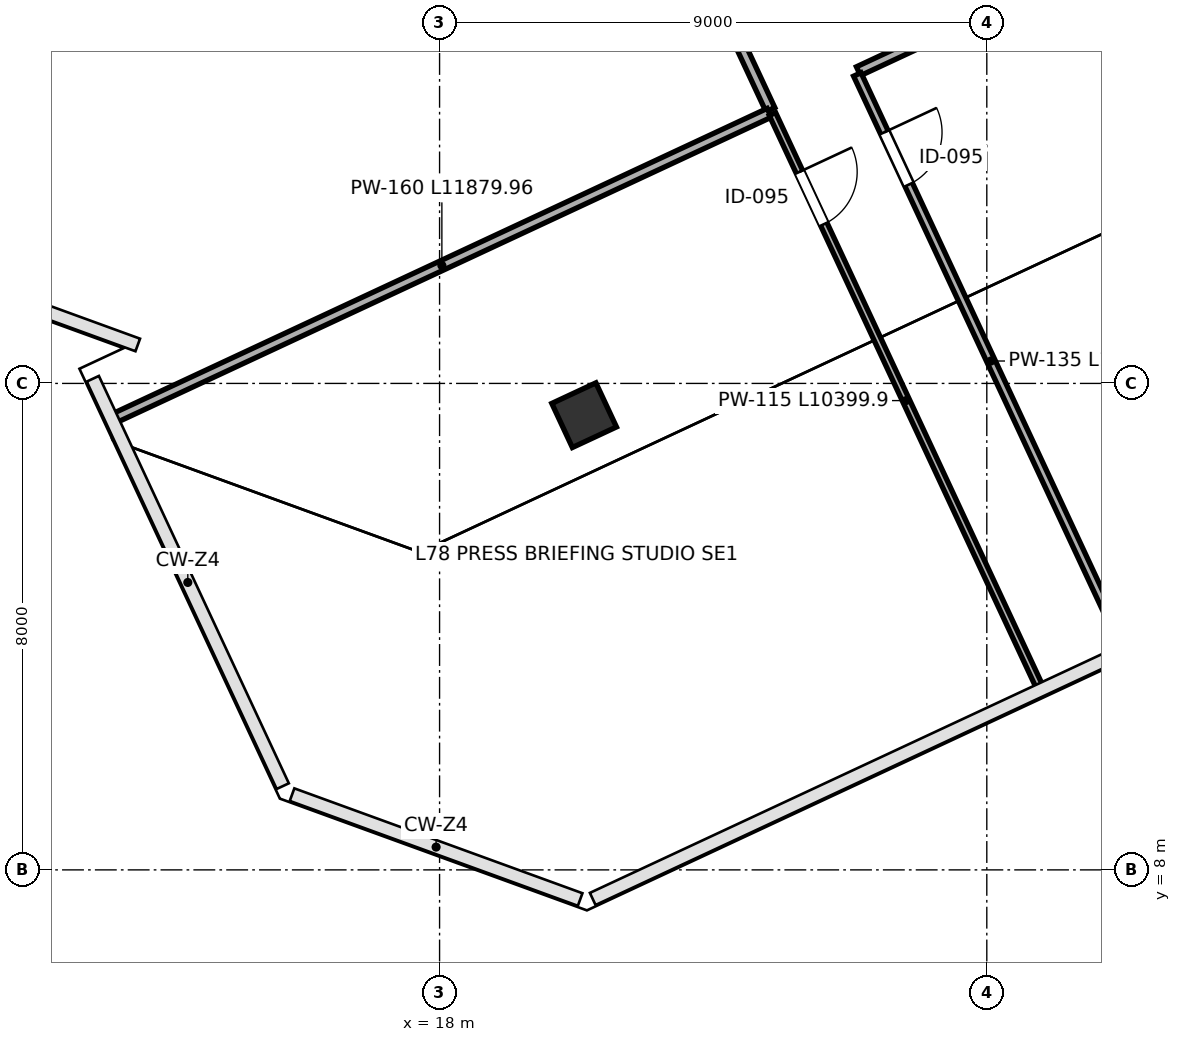
"""IFC4 building model, lengths in metres.
Left out: names, types, materials, properties, quantities, classifications, styles, units other than length and angle.
Written with IfcOpenShell. Run it as: python <this file> out.ifc"""

import sys

from ifc_helpers import new_model, si_unit, direction, frame, frame_2d, origin, origin_2d, place, context, subcontext, project, spatial, rectangle, extrude, clip, halfspace, source, transform, mapped, element, fill, save


model = new_model("IFC4")
c1 = context("Model", 3, precision=1e-05, world=origin(), true_north=direction((0.0, 1.0)))
c2 = subcontext(c1, "Body", "Model", "MODEL_VIEW")
j1 = project(units=[si_unit("LENGTHUNIT", "METRE"), si_unit("PLANEANGLEUNIT", "RADIAN")], contexts=[c1])
p1 = place(None, origin())
s1 = spatial("IfcSite", under=j1, at=p1, CompositionType="ELEMENT")
p2 = place(p1, origin())
s2 = spatial("IfcBuilding", under=s1, at=p2, CompositionType="ELEMENT")
p3 = place(p2, frame((0.0, 0.0, 345.0)))
s3 = spatial("IfcBuildingStorey", under=s2, at=p3, CompositionType="ELEMENT", Elevation=345.0)
p4 = place(p3, frame((20.377, 15.478, 0.0), z_axis=(-0.168828266365, 0.015181367691, 0.985528559988), x_axis=(0.927452745879, 0.340925094738, 0.153627744696)))
e1 = element("IfcColumn", 1, at=p4, inside=s3, PredefinedType="COLUMN", context=c2, shape_type="Clipping", body=[
    clip(clip(extrude(rectangle(XDim=0.8, YDim=0.8, at=origin_2d()), origin(), (0.0, 0.0, 1.0), 4.262), halfspace(frame((0.0, 0.0, 0.092), z_axis=(0.0, 0.0, -1.0), x_axis=(1.0, 0.0, 0.0)), False)), halfspace(frame((0.0, 0.0, 4.169), z_axis=(0.0, 0.0, 1.0), x_axis=(1.0, 0.0, 0.0)), False)),
])
p5 = place(p3, frame((21.864, 23.884, 0.0), z_axis=(0.0, 0.0, 1.0), x_axis=(0.42259522887, -0.906318527085, 0.0)))
e2 = element("IfcWall", 2, at=p5, inside=s3, PredefinedType="PARTITIONING", context=c2, shape_type="SweptSolid", body=[
    extrude(rectangle(XDim=3.73, YDim=0.16, at=frame_2d((1.865, 0.0))), origin(), (0.0, 0.0, 1.0), 3.92),
])
p6 = place(p3, frame((24.89, 21.135, 0.0), z_axis=(0.0, 0.0, 1.0), x_axis=(0.906308982529, 0.42261569799, 0.0)))
e3 = element("IfcWall", 3, at=p6, inside=s3, PredefinedType="PARTITIONING", context=c2, shape_type="SweptSolid", body=[
    extrude(rectangle(XDim=17.54, YDim=0.16, at=frame_2d((8.77, 0.0))), origin(), (0.0, 0.0, 1.0), 3.92),
])
p7 = place(p3, frame((12.654, 15.429, 0.0), z_axis=(0.0, 0.0, 1.0), x_axis=(0.906316447934, 0.42259968789, 0.0)))
e4 = element("IfcWall", 4, at=p7, inside=s3, PredefinedType="PARTITIONING", context=c2, shape_type="SweptSolid", body=[
    extrude(rectangle(XDim=11.88, YDim=0.16, at=frame_2d((5.94, 0.0))), origin(), (0.0, 0.0, 1.0), 3.92),
])
p8 = place(p3, frame((24.87, 21.081, 0.0), z_axis=(0.0, 0.0, 1.0), x_axis=(0.422623279804, -0.906305447058, 0.0)))
e5 = element("IfcWall", 5, at=p8, inside=s3, PredefinedType="PARTITIONING", context=c2, shape_type="SweptSolid", body=[
    extrude(rectangle(XDim=10.4, YDim=0.135, at=frame_2d((5.2, 0.0))), origin(), (0.0, 0.0, 1.0), 3.92),
])
p9 = place(p8, frame((1.05, 0.0, 0.0)))
e6 = element("IfcOpeningElement", 6, at=p9, cuts=e5, PredefinedType="OPENING", context=c2, shape_type="SweptSolid", body=[
    extrude(rectangle(XDim=0.95, YDim=2.15, at=frame_2d((0.475, 1.075))), frame((0.0, 0.078, 0.0), z_axis=(0.0, -1.0, 0.0), x_axis=(1.0, 0.0, 0.0)), (0.0, 0.0, 1.0), 0.155),
])
p10 = place(p3, frame((23.475, 20.43, 0.0), z_axis=(0.0, 0.0, 1.0), x_axis=(0.422603997267, -0.906314438533, 0.0)))
e7 = element("IfcWall", 7, at=p10, inside=s3, PredefinedType="PARTITIONING", context=c2, shape_type="SweptSolid", body=[
    extrude(rectangle(XDim=10.4, YDim=0.115, at=frame_2d((5.2, 0.0))), origin(), (0.0, 0.0, 1.0), 3.92),
])
p11 = place(p10, frame((1.05, 0.0, 0.0)))
e8 = element("IfcOpeningElement", 8, at=p11, cuts=e7, PredefinedType="OPENING", context=c2, shape_type="SweptSolid", body=[
    extrude(rectangle(XDim=0.95, YDim=2.15, at=frame_2d((0.475, 1.075))), frame((0.0, 0.067, 0.0), z_axis=(0.0, -1.0, 0.0), x_axis=(1.0, 0.0, 0.0)), (0.0, 0.0, 1.0), 0.135),
])
m1 = source(origin(), c2, "Body", "SweptSolid", [
    extrude(rectangle(XDim=0.95, YDim=2.15, at=frame_2d((0.475, 1.075))), frame((0.0, 0.025, 0.0), z_axis=(0.0, -1.0, 0.0), x_axis=(1.0, 0.0, 0.0)), (0.0, 0.0, 1.0), 0.05),
])
p12 = place(p9, origin())
e9 = element("IfcDoor", 9, at=p12, inside=s3, OperationType="SINGLE_SWING_LEFT", PredefinedType="DOOR", context=c2, shape_type="MappedRepresentation", body=[
    mapped(m1, transform((0.0, 0.0, 0.0), scale=1.0)),
])
fill(e6, e9)
p13 = place(p11, origin())
e10 = element("IfcDoor", 10, at=p13, inside=s3, OperationType="SINGLE_SWING_LEFT", PredefinedType="DOOR", context=c2, shape_type="MappedRepresentation", body=[
    mapped(m1, transform((0.0, 0.0, 0.0), scale=1.0)),
])
fill(e8, e10)
save(model, sys.argv[1])
